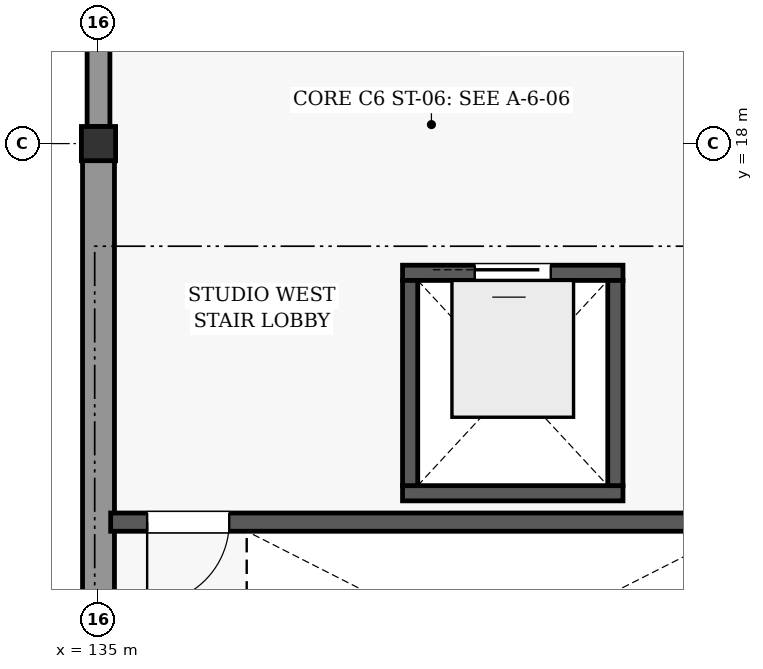
"""IFC4 building model, lengths in metres.
Left out: names, types, materials, properties, quantities, classifications, styles, units other than length and angle.
Written with IfcOpenShell. Run it as: python <this file> out.ifc"""

import sys

from ifc_helpers import new_model, si_unit, direction, frame, frame_2d, origin, origin_2d, place, context, subcontext, project, spatial, rectangle, extrude, element, fill, save


model = new_model("IFC4")
c1 = context("Model", 3, precision=1e-05, world=origin(), true_north=direction((0.0, 1.0)))
c2 = subcontext(c1, "Body", "Model", "MODEL_VIEW")
j1 = project(units=[si_unit("LENGTHUNIT", "METRE"), si_unit("PLANEANGLEUNIT", "RADIAN")], contexts=[c1])
p1 = place(None, origin())
s1 = spatial("IfcSite", under=j1, at=p1, CompositionType="ELEMENT")
p2 = place(p1, origin())
s2 = spatial("IfcBuilding", under=s1, at=p2, CompositionType="ELEMENT")
p3 = place(p2, frame((0.0, 0.0, 8.4)))
s3 = spatial("IfcBuildingStorey", under=s2, at=p3, CompositionType="ELEMENT", Elevation=8.4)
p4 = place(p3, frame((135.0, 18.0, 0.0), z_axis=(0.0, 0.0, 1.0), x_axis=(1.0, 0.0, 0.0)))
e1 = element("IfcColumn", 1, at=p4, inside=s3, PredefinedType="COLUMN", context=c2, shape_type="SweptSolid", body=[
    extrude(rectangle(XDim=0.45, YDim=0.45, at=origin_2d()), origin(), (0.0, 0.0, 1.0), 3.6),
])
p5 = place(p3, frame((135.0, 9.223, 0.0), z_axis=(0.0, 0.0, 1.0), x_axis=(0.0, 1.0, 0.0)))
e2 = element("IfcWall", 2, at=p5, inside=s3, PredefinedType="SOLIDWALL", context=c2, shape_type="SweptSolid", body=[
    extrude(rectangle(XDim=8.554, YDim=0.42, at=frame_2d((4.277, 0.0))), origin(), (0.0, 0.0, 1.0), 2.892),
])
p6 = place(p3, frame((135.0, 18.223, 0.0), z_axis=(0.0, 0.0, 1.0), x_axis=(0.0, 1.0, 0.0)))
e3 = element("IfcWall", 3, at=p6, inside=s3, PredefinedType="SOLIDWALL", context=c2, shape_type="SweptSolid", body=[
    extrude(rectangle(XDim=8.554, YDim=0.3, at=frame_2d((4.277, 0.0))), origin(), (0.0, 0.0, 1.0), 2.892),
])
p7 = place(p6, frame((1.931, 0.0, 0.85)))
e4 = element("IfcOpeningElement", 4, at=p7, cuts=e3, PredefinedType="OPENING", context=c2, shape_type="SweptSolid", body=[
    extrude(rectangle(XDim=1.38, YDim=1.52, at=frame_2d((0.69, 0.76))), frame((0.0, 0.16, 0.0), z_axis=(0.0, -1.0, 0.0), x_axis=(1.0, 0.0, 0.0)), (0.0, 0.0, 1.0), 0.32),
])
p8 = place(p6, frame((5.243, 0.0, 0.85)))
e5 = element("IfcOpeningElement", 5, at=p8, cuts=e3, PredefinedType="OPENING", context=c2, shape_type="SweptSolid", body=[
    extrude(rectangle(XDim=1.38, YDim=1.52, at=frame_2d((0.69, 0.76))), frame((0.0, 0.16, 0.0), z_axis=(0.0, -1.0, 0.0), x_axis=(1.0, 0.0, 0.0)), (0.0, 0.0, 1.0), 0.32),
])
p9 = place(p3, frame((135.16, 13.02, 0.0), z_axis=(0.0, 0.0, 1.0), x_axis=(1.0, 0.0, 0.0)))
e6 = element("IfcWall", 6, at=p9, inside=s3, PredefinedType="SHEAR", context=c2, shape_type="SweptSolid", body=[
    extrude(rectangle(XDim=8.44, YDim=0.24, at=frame_2d((4.22, 0.0))), origin(), (0.0, 0.0, 1.0), 3.35),
])
p10 = place(p9, frame((0.48, 0.0, 0.0)))
e7 = element("IfcOpeningElement", 7, at=p10, cuts=e6, PredefinedType="OPENING", context=c2, shape_type="SweptSolid", body=[
    extrude(rectangle(XDim=1.08, YDim=2.08, at=frame_2d((0.54, 1.04))), frame((0.0, 0.13, 0.0), z_axis=(0.0, -1.0, 0.0), x_axis=(1.0, 0.0, 0.0)), (0.0, 0.0, 1.0), 0.26),
])
p11 = place(p3, frame((139.0, 13.4, 0.0), z_axis=(0.0, 0.0, 1.0), x_axis=(1.0, 0.0, 0.0)))
e8 = element("IfcWall", 8, at=p11, inside=s3, PredefinedType="SHEAR", context=c2, shape_type="SweptSolid", body=[
    extrude(rectangle(XDim=2.9, YDim=0.2, at=frame_2d((1.45, 0.0))), origin(), (0.0, 0.0, 1.0), 3.35),
])
p12 = place(p3, frame((139.0, 16.3, 0.0), z_axis=(0.0, 0.0, 1.0), x_axis=(1.0, 0.0, 0.0)))
e9 = element("IfcWall", 9, at=p12, inside=s3, PredefinedType="SHEAR", context=c2, shape_type="SweptSolid", body=[
    extrude(rectangle(XDim=2.9, YDim=0.2, at=frame_2d((1.45, 0.0))), origin(), (0.0, 0.0, 1.0), 3.35),
])
p13 = place(p12, frame((0.95, 0.0, 0.0)))
e10 = element("IfcOpeningElement", 10, at=p13, cuts=e9, PredefinedType="OPENING", context=c2, shape_type="SweptSolid", body=[
    extrude(rectangle(XDim=1.0, YDim=2.1, at=frame_2d((0.5, 1.05))), frame((0.0, 0.11, 0.0), z_axis=(0.0, -1.0, 0.0), x_axis=(1.0, 0.0, 0.0)), (0.0, 0.0, 1.0), 0.22),
])
for number, where, z_axis, x_axis in (
    (11, (139.1, 13.5, 0.0), (0.0, 0.0, 1.0), (0.0, 1.0, 0.0)),
    (12, (141.8, 13.5, 0.0), (0.0, 0.0, 1.0), (0.0, 1.0, 0.0)),
):
    element("IfcWall", number, at=place(p3, frame(where, z_axis=z_axis, x_axis=x_axis)), inside=s3, PredefinedType="SHEAR", context=c2, shape_type="SweptSolid", body=[
        extrude(rectangle(XDim=2.7, YDim=0.2, at=frame_2d((1.35, 0.0))), origin(), (0.0, 0.0, 1.0), 3.35),
    ])
p14 = place(p10, frame((1.08, 0.0, 0.0), z_axis=(0.0, 0.0, 1.0), x_axis=(-1.0, 0.0, 0.0)))
e13 = element("IfcDoor", 13, at=p14, inside=s3, OperationType="SINGLE_SWING_LEFT", PredefinedType="DOOR", context=c2, shape_type="SweptSolid", body=[
    extrude(rectangle(XDim=1.08, YDim=2.08, at=frame_2d((0.54, 1.04))), frame((0.0, 0.025, 0.0), z_axis=(0.0, -1.0, 0.0), x_axis=(1.0, 0.0, 0.0)), (0.0, 0.0, 1.0), 0.05),
])
fill(e7, e13)
p15 = place(p13, origin())
e14 = element("IfcDoor", 14, at=p15, inside=s3, OperationType="SLIDING_TO_LEFT", PredefinedType="DOOR", context=c2, shape_type="SweptSolid", body=[
    extrude(rectangle(XDim=1.0, YDim=2.1, at=frame_2d((0.5, 1.05))), frame((0.0, 0.025, 0.0), z_axis=(0.0, -1.0, 0.0), x_axis=(1.0, 0.0, 0.0)), (0.0, 0.0, 1.0), 0.05),
])
fill(e10, e14)
save(model, sys.argv[1])
